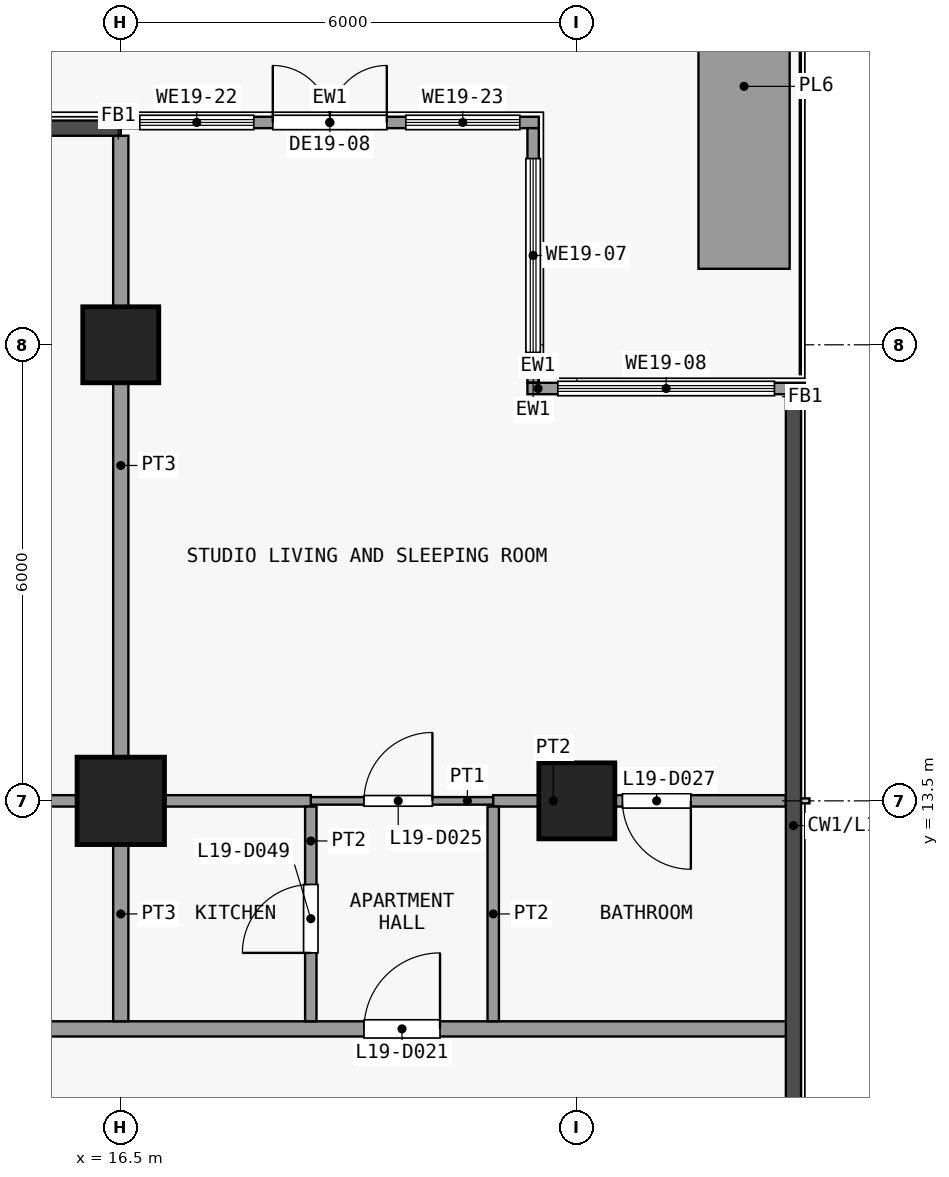
"""IFC4 building model, lengths in metres.
Left out: names, types, materials, properties, quantities, classifications, styles, units other than length and angle.
Written with IfcOpenShell. Run it as: python <this file> out.ifc"""

import sys

from ifc_helpers import new_model, si_unit, direction, frame, frame_2d, origin, origin_2d, place, context, subcontext, project, spatial, rectangle, extrude, element, fill, save


model = new_model("IFC4")
c1 = context("Model", 3, precision=1e-05, world=origin(), true_north=direction((0.0, 1.0)))
c2 = subcontext(c1, "Body", "Model", "MODEL_VIEW")
j1 = project(units=[si_unit("LENGTHUNIT", "METRE"), si_unit("PLANEANGLEUNIT", "RADIAN")], contexts=[c1])
p1 = place(None, origin())
s1 = spatial("IfcSite", under=j1, at=p1, CompositionType="ELEMENT")
p2 = place(p1, origin())
s2 = spatial("IfcBuilding", under=s1, at=p2, CompositionType="ELEMENT")
p3 = place(p2, frame((0.0, 0.0, 81.1)))
s3 = spatial("IfcBuildingStorey", under=s2, at=p3, CompositionType="ELEMENT", Elevation=81.1)
p4 = place(p3, frame((16.5, 13.5, 0.0), z_axis=(0.0, 0.0, 1.0), x_axis=(1.0, 0.0, 0.0)))
e1 = element("IfcColumn", 1, at=p4, inside=s3, PredefinedType="COLUMN", context=c2, shape_type="SweptSolid", body=[
    extrude(rectangle(XDim=1.15, YDim=1.15, at=origin_2d()), origin(), (0.0, 0.0, 1.0), 3.6),
])
for number, where, z_axis, x_axis in (
    (2, (16.5, 19.5, 0.0), (0.0, 0.0, 1.0), (1.0, 0.0, 0.0)),
    (3, (22.5, 13.5, 0.0), (0.0, 0.0, 1.0), (1.0, 0.0, 0.0)),
):
    element("IfcColumn", number, at=place(p3, frame(where, z_axis=z_axis, x_axis=x_axis)), inside=s3, PredefinedType="COLUMN", context=c2, shape_type="SweptSolid", body=[
        extrude(rectangle(XDim=1.0, YDim=1.0, at=origin_2d()), origin(), (0.0, 0.0, 1.0), 3.6),
    ])
p5 = place(p3, frame((21.925, 22.35, 0.0), z_axis=(0.0, 0.0, 1.0), x_axis=(0.0, -1.0, 0.0)))
e4 = element("IfcWall", 4, at=p5, inside=s3, PredefinedType="SOLIDWALL", context=c2, shape_type="SweptSolid", body=[
    extrude(rectangle(XDim=3.35, YDim=0.15, at=frame_2d((1.675, 0.0))), origin(), (0.0, 0.0, 1.0), 3.3),
])
p6 = place(p5, frame((0.4, 0.0, 0.9)))
e5 = element("IfcOpeningElement", 5, at=p6, cuts=e4, PredefinedType="OPENING", context=c2, shape_type="SweptSolid", body=[
    extrude(rectangle(XDim=2.55, YDim=2.4, at=frame_2d((1.275, 1.2))), frame((0.0, 0.085, 0.0), z_axis=(0.0, -1.0, 0.0), x_axis=(1.0, 0.0, 0.0)), (0.0, 0.0, 1.0), 0.17),
])
p7 = place(p3, frame((21.85, 18.925, 0.0), z_axis=(0.0, 0.0, 1.0), x_axis=(1.0, 0.0, 0.0)))
e6 = element("IfcWall", 6, at=p7, inside=s3, PredefinedType="SOLIDWALL", context=c2, shape_type="SweptSolid", body=[
    extrude(rectangle(XDim=3.65, YDim=0.15, at=frame_2d((1.825, 0.0))), origin(), (0.0, 0.0, 1.0), 3.3),
])
p8 = place(p7, frame((0.4, 0.0, 0.9)))
e7 = element("IfcOpeningElement", 7, at=p8, cuts=e6, PredefinedType="OPENING", context=c2, shape_type="SweptSolid", body=[
    extrude(rectangle(XDim=2.85, YDim=2.4, at=frame_2d((1.425, 1.2))), frame((0.0, 0.085, 0.0), z_axis=(0.0, -1.0, 0.0), x_axis=(1.0, 0.0, 0.0)), (0.0, 0.0, 1.0), 0.17),
])
p9 = place(p3, frame((16.5, 22.425, 0.0), z_axis=(0.0, 0.0, 1.0), x_axis=(1.0, 0.0, 0.0)))
e8 = element("IfcWall", 8, at=p9, inside=s3, PredefinedType="SOLIDWALL", context=c2, shape_type="SweptSolid", body=[
    extrude(rectangle(XDim=5.5, YDim=0.15, at=frame_2d((2.75, 0.0))), origin(), (0.0, 0.0, 1.0), 3.3),
])
p10 = place(p9, frame((2.0, 0.0, 0.0)))
e9 = element("IfcOpeningElement", 9, at=p10, cuts=e8, PredefinedType="OPENING", context=c2, shape_type="SweptSolid", body=[
    extrude(rectangle(XDim=1.5, YDim=2.4, at=frame_2d((0.75, 1.2))), frame((0.0, 0.085, 0.0), z_axis=(0.0, -1.0, 0.0), x_axis=(1.0, 0.0, 0.0)), (0.0, 0.0, 1.0), 0.17),
])
p11 = place(p9, frame((0.25, 0.0, 0.9)))
e10 = element("IfcOpeningElement", 10, at=p11, cuts=e8, PredefinedType="OPENING", context=c2, shape_type="SweptSolid", body=[
    extrude(rectangle(XDim=1.5, YDim=2.1, at=frame_2d((0.75, 1.05))), frame((0.0, 0.085, 0.0), z_axis=(0.0, -1.0, 0.0), x_axis=(1.0, 0.0, 0.0)), (0.0, 0.0, 1.0), 0.17),
])
p12 = place(p9, frame((3.75, 0.0, 0.9)))
e11 = element("IfcOpeningElement", 11, at=p12, cuts=e8, PredefinedType="OPENING", context=c2, shape_type="SweptSolid", body=[
    extrude(rectangle(XDim=1.5, YDim=2.1, at=frame_2d((0.75, 1.05))), frame((0.0, 0.085, 0.0), z_axis=(0.0, -1.0, 0.0), x_axis=(1.0, 0.0, 0.0)), (0.0, 0.0, 1.0), 0.17),
])
p13 = place(p3, frame((24.7, 20.5, 0.0), z_axis=(0.0, 0.0, 1.0), x_axis=(0.0, 1.0, 0.0)))
e12 = element("IfcWall", 12, at=p13, inside=s3, PredefinedType="USERDEFINED", context=c2, shape_type="SweptSolid", body=[
    extrude(rectangle(XDim=4.8, YDim=1.2, at=frame_2d((2.4, 0.0))), origin(), (0.0, 0.0, 1.0), 0.9),
])
p14 = place(p3, frame((-23.85, 10.5, 0.0), z_axis=(0.0, 0.0, 1.0), x_axis=(1.0, 0.0, 0.0)))
e13 = element("IfcWall", 13, at=p14, inside=s3, PredefinedType="PARTITIONING", context=c2, shape_type="SweptSolid", body=[
    extrude(rectangle(XDim=49.2, YDim=0.2, at=frame_2d((24.6, 0.0))), origin(), (0.0, 0.0, 1.0), 3.3),
])
p15 = place(p14, frame((5.55, 0.0, 0.0)))
e14 = element("IfcOpeningElement", 14, at=p15, cuts=e13, PredefinedType="OPENING", context=c2, shape_type="SweptSolid", body=[
    extrude(rectangle(XDim=1.0, YDim=2.1, at=frame_2d((0.5, 1.05))), frame((0.0, 0.11, 0.0), z_axis=(0.0, -1.0, 0.0), x_axis=(1.0, 0.0, 0.0)), (0.0, 0.0, 1.0), 0.22),
])
p16 = place(p14, frame((14.05, 0.0, 0.0)))
e15 = element("IfcOpeningElement", 15, at=p16, cuts=e13, PredefinedType="OPENING", context=c2, shape_type="SweptSolid", body=[
    extrude(rectangle(XDim=1.0, YDim=2.1, at=frame_2d((0.5, 1.05))), frame((0.0, 0.11, 0.0), z_axis=(0.0, -1.0, 0.0), x_axis=(1.0, 0.0, 0.0)), (0.0, 0.0, 1.0), 0.22),
])
p17 = place(p14, frame((22.55, 0.0, 0.0)))
e16 = element("IfcOpeningElement", 16, at=p17, cuts=e13, PredefinedType="OPENING", context=c2, shape_type="SweptSolid", body=[
    extrude(rectangle(XDim=1.0, YDim=2.1, at=frame_2d((0.5, 1.05))), frame((0.0, 0.11, 0.0), z_axis=(0.0, -1.0, 0.0), x_axis=(1.0, 0.0, 0.0)), (0.0, 0.0, 1.0), 0.22),
])
p18 = place(p14, frame((43.55, 0.0, 0.0)))
e17 = element("IfcOpeningElement", 17, at=p18, cuts=e13, PredefinedType="OPENING", context=c2, shape_type="SweptSolid", body=[
    extrude(rectangle(XDim=1.0, YDim=2.1, at=frame_2d((0.5, 1.05))), frame((0.0, 0.11, 0.0), z_axis=(0.0, -1.0, 0.0), x_axis=(1.0, 0.0, 0.0)), (0.0, 0.0, 1.0), 0.22),
])
p19 = place(p3, frame((19.0, 13.5, 0.0), z_axis=(0.0, 0.0, 1.0), x_axis=(1.0, 0.0, 0.0)))
e18 = element("IfcWall", 18, at=p19, inside=s3, PredefinedType="PARTITIONING", context=c2, shape_type="SweptSolid", body=[
    extrude(rectangle(XDim=2.4, YDim=0.1, at=frame_2d((1.2, 0.0))), origin(), (0.0, 0.0, 1.0), 3.3),
])
p20 = place(p19, frame((0.7, 0.0, 0.0)))
e19 = element("IfcOpeningElement", 19, at=p20, cuts=e18, PredefinedType="OPENING", context=c2, shape_type="SweptSolid", body=[
    extrude(rectangle(XDim=0.9, YDim=2.1, at=frame_2d((0.45, 1.05))), frame((0.0, 0.06, 0.0), z_axis=(0.0, -1.0, 0.0), x_axis=(1.0, 0.0, 0.0)), (0.0, 0.0, 1.0), 0.12),
])
p21 = place(p3, frame((10.65, 13.5, 0.0), z_axis=(0.0, 0.0, 1.0), x_axis=(1.0, 0.0, 0.0)))
e20 = element("IfcWall", 20, at=p21, inside=s3, PredefinedType="PARTITIONING", context=c2, shape_type="SweptSolid", body=[
    extrude(rectangle(XDim=8.35, YDim=0.15, at=frame_2d((4.175, 0.0))), origin(), (0.0, 0.0, 1.0), 3.3),
])
p22 = place(p3, frame((21.4, 13.5, 0.0), z_axis=(0.0, 0.0, 1.0), x_axis=(1.0, 0.0, 0.0)))
e21 = element("IfcWall", 21, at=p22, inside=s3, PredefinedType="PARTITIONING", context=c2, shape_type="SweptSolid", body=[
    extrude(rectangle(XDim=3.85, YDim=0.15, at=frame_2d((1.925, 0.0))), origin(), (0.0, 0.0, 1.0), 3.3),
])
p23 = place(p22, frame((1.7, 0.0, 0.0)))
e22 = element("IfcOpeningElement", 22, at=p23, cuts=e21, PredefinedType="OPENING", context=c2, shape_type="SweptSolid", body=[
    extrude(rectangle(XDim=0.9, YDim=2.1, at=frame_2d((0.45, 1.05))), frame((0.0, 0.085, 0.0), z_axis=(0.0, -1.0, 0.0), x_axis=(1.0, 0.0, 0.0)), (0.0, 0.0, 1.0), 0.17),
])
p24 = place(p3, frame((16.5, 10.6, 0.0), z_axis=(0.0, 0.0, 1.0), x_axis=(0.0, 1.0, 0.0)))
e23 = element("IfcWall", 23, at=p24, inside=s3, PredefinedType="PARTITIONING", context=c2, shape_type="SweptSolid", body=[
    extrude(rectangle(XDim=2.825, YDim=0.2, at=frame_2d((1.413, 0.0))), origin(), (0.0, 0.0, 1.0), 3.3),
])
p25 = place(p3, frame((16.5, 13.575, 0.0), z_axis=(0.0, 0.0, 1.0), x_axis=(0.0, 1.0, 0.0)))
e24 = element("IfcWall", 24, at=p25, inside=s3, PredefinedType="PARTITIONING", context=c2, shape_type="SweptSolid", body=[
    extrude(rectangle(XDim=8.675, YDim=0.2, at=frame_2d((4.337, 0.0))), origin(), (0.0, 0.0, 1.0), 3.3),
])
p26 = place(p3, frame((19.0, 10.6, 0.0), z_axis=(0.0, 0.0, 1.0), x_axis=(0.0, 1.0, 0.0)))
e25 = element("IfcWall", 25, at=p26, inside=s3, PredefinedType="PARTITIONING", context=c2, shape_type="SweptSolid", body=[
    extrude(rectangle(XDim=2.825, YDim=0.15, at=frame_2d((1.413, 0.0))), origin(), (0.0, 0.0, 1.0), 3.3),
])
p27 = place(p26, frame((0.9, 0.0, 0.0)))
e26 = element("IfcOpeningElement", 26, at=p27, cuts=e25, PredefinedType="OPENING", context=c2, shape_type="SweptSolid", body=[
    extrude(rectangle(XDim=0.9, YDim=2.1, at=frame_2d((0.45, 1.05))), frame((0.0, 0.085, 0.0), z_axis=(0.0, -1.0, 0.0), x_axis=(1.0, 0.0, 0.0)), (0.0, 0.0, 1.0), 0.17),
])
p28 = place(p3, frame((21.4, 10.6, 0.0), z_axis=(0.0, 0.0, 1.0), x_axis=(0.0, 1.0, 0.0)))
e27 = element("IfcWall", 27, at=p28, inside=s3, PredefinedType="PARTITIONING", context=c2, shape_type="SweptSolid", body=[
    extrude(rectangle(XDim=2.825, YDim=0.15, at=frame_2d((1.413, 0.0))), origin(), (0.0, 0.0, 1.0), 3.3),
])
p29 = place(p6, origin())
e28 = element("IfcWindow", 28, at=p29, inside=s3, PartitioningType="SINGLE_PANEL", PredefinedType="WINDOW", context=c2, shape_type="SweptSolid", body=[
    extrude(rectangle(XDim=2.55, YDim=2.4, at=frame_2d((1.275, 1.2))), frame((0.0, 0.03, 0.0), z_axis=(0.0, -1.0, 0.0), x_axis=(1.0, 0.0, 0.0)), (0.0, 0.0, 1.0), 0.06),
])
fill(e5, e28)
p30 = place(p8, origin())
e29 = element("IfcWindow", 29, at=p30, inside=s3, PartitioningType="SINGLE_PANEL", PredefinedType="WINDOW", context=c2, shape_type="SweptSolid", body=[
    extrude(rectangle(XDim=2.85, YDim=2.4, at=frame_2d((1.425, 1.2))), frame((0.0, 0.03, 0.0), z_axis=(0.0, -1.0, 0.0), x_axis=(1.0, 0.0, 0.0)), (0.0, 0.0, 1.0), 0.06),
])
fill(e7, e29)
p31 = place(p10, origin())
e30 = element("IfcDoor", 30, at=p31, inside=s3, OperationType="DOUBLE_DOOR_SINGLE_SWING", PredefinedType="DOOR", context=c2, shape_type="SweptSolid", body=[
    extrude(rectangle(XDim=1.5, YDim=2.4, at=frame_2d((0.75, 1.2))), frame((0.0, 0.025, 0.0), z_axis=(0.0, -1.0, 0.0), x_axis=(1.0, 0.0, 0.0)), (0.0, 0.0, 1.0), 0.05),
])
fill(e9, e30)
p32 = place(p11, origin())
e31 = element("IfcWindow", 31, at=p32, inside=s3, PartitioningType="SINGLE_PANEL", PredefinedType="WINDOW", context=c2, shape_type="SweptSolid", body=[
    extrude(rectangle(XDim=1.5, YDim=2.1, at=frame_2d((0.75, 1.05))), frame((0.0, 0.03, 0.0), z_axis=(0.0, -1.0, 0.0), x_axis=(1.0, 0.0, 0.0)), (0.0, 0.0, 1.0), 0.06),
])
fill(e10, e31)
p33 = place(p12, origin())
e32 = element("IfcWindow", 32, at=p33, inside=s3, PartitioningType="SINGLE_PANEL", PredefinedType="WINDOW", context=c2, shape_type="SweptSolid", body=[
    extrude(rectangle(XDim=1.5, YDim=2.1, at=frame_2d((0.75, 1.05))), frame((0.0, 0.03, 0.0), z_axis=(0.0, -1.0, 0.0), x_axis=(1.0, 0.0, 0.0)), (0.0, 0.0, 1.0), 0.06),
])
fill(e11, e32)
p34 = place(p18, origin())
e33 = element("IfcDoor", 33, at=p34, inside=s3, OperationType="SINGLE_SWING_LEFT", PredefinedType="DOOR", context=c2, shape_type="SweptSolid", body=[
    extrude(rectangle(XDim=1.0, YDim=2.1, at=frame_2d((0.5, 1.05))), frame((0.0, 0.025, 0.0), z_axis=(0.0, -1.0, 0.0), x_axis=(1.0, 0.0, 0.0)), (0.0, 0.0, 1.0), 0.05),
])
fill(e17, e33)
p35 = place(p20, origin())
e34 = element("IfcDoor", 34, at=p35, inside=s3, OperationType="SINGLE_SWING_LEFT", PredefinedType="DOOR", context=c2, shape_type="SweptSolid", body=[
    extrude(rectangle(XDim=0.9, YDim=2.1, at=frame_2d((0.45, 1.05))), frame((0.0, 0.025, 0.0), z_axis=(0.0, -1.0, 0.0), x_axis=(1.0, 0.0, 0.0)), (0.0, 0.0, 1.0), 0.05),
])
fill(e19, e34)
p36 = place(p23, origin())
e35 = element("IfcDoor", 35, at=p36, inside=s3, OperationType="SINGLE_SWING_RIGHT", PredefinedType="DOOR", context=c2, shape_type="SweptSolid", body=[
    extrude(rectangle(XDim=0.9, YDim=2.1, at=frame_2d((0.45, 1.05))), frame((0.0, 0.025, 0.0), z_axis=(0.0, -1.0, 0.0), x_axis=(1.0, 0.0, 0.0)), (0.0, 0.0, 1.0), 0.05),
])
fill(e22, e35)
p37 = place(p27, origin())
e36 = element("IfcDoor", 36, at=p37, inside=s3, OperationType="SINGLE_SWING_RIGHT", PredefinedType="DOOR", context=c2, shape_type="SweptSolid", body=[
    extrude(rectangle(XDim=0.9, YDim=2.1, at=frame_2d((0.45, 1.05))), frame((0.0, 0.025, 0.0), z_axis=(0.0, -1.0, 0.0), x_axis=(1.0, 0.0, 0.0)), (0.0, 0.0, 1.0), 0.05),
])
fill(e26, e36)
save(model, sys.argv[1])
